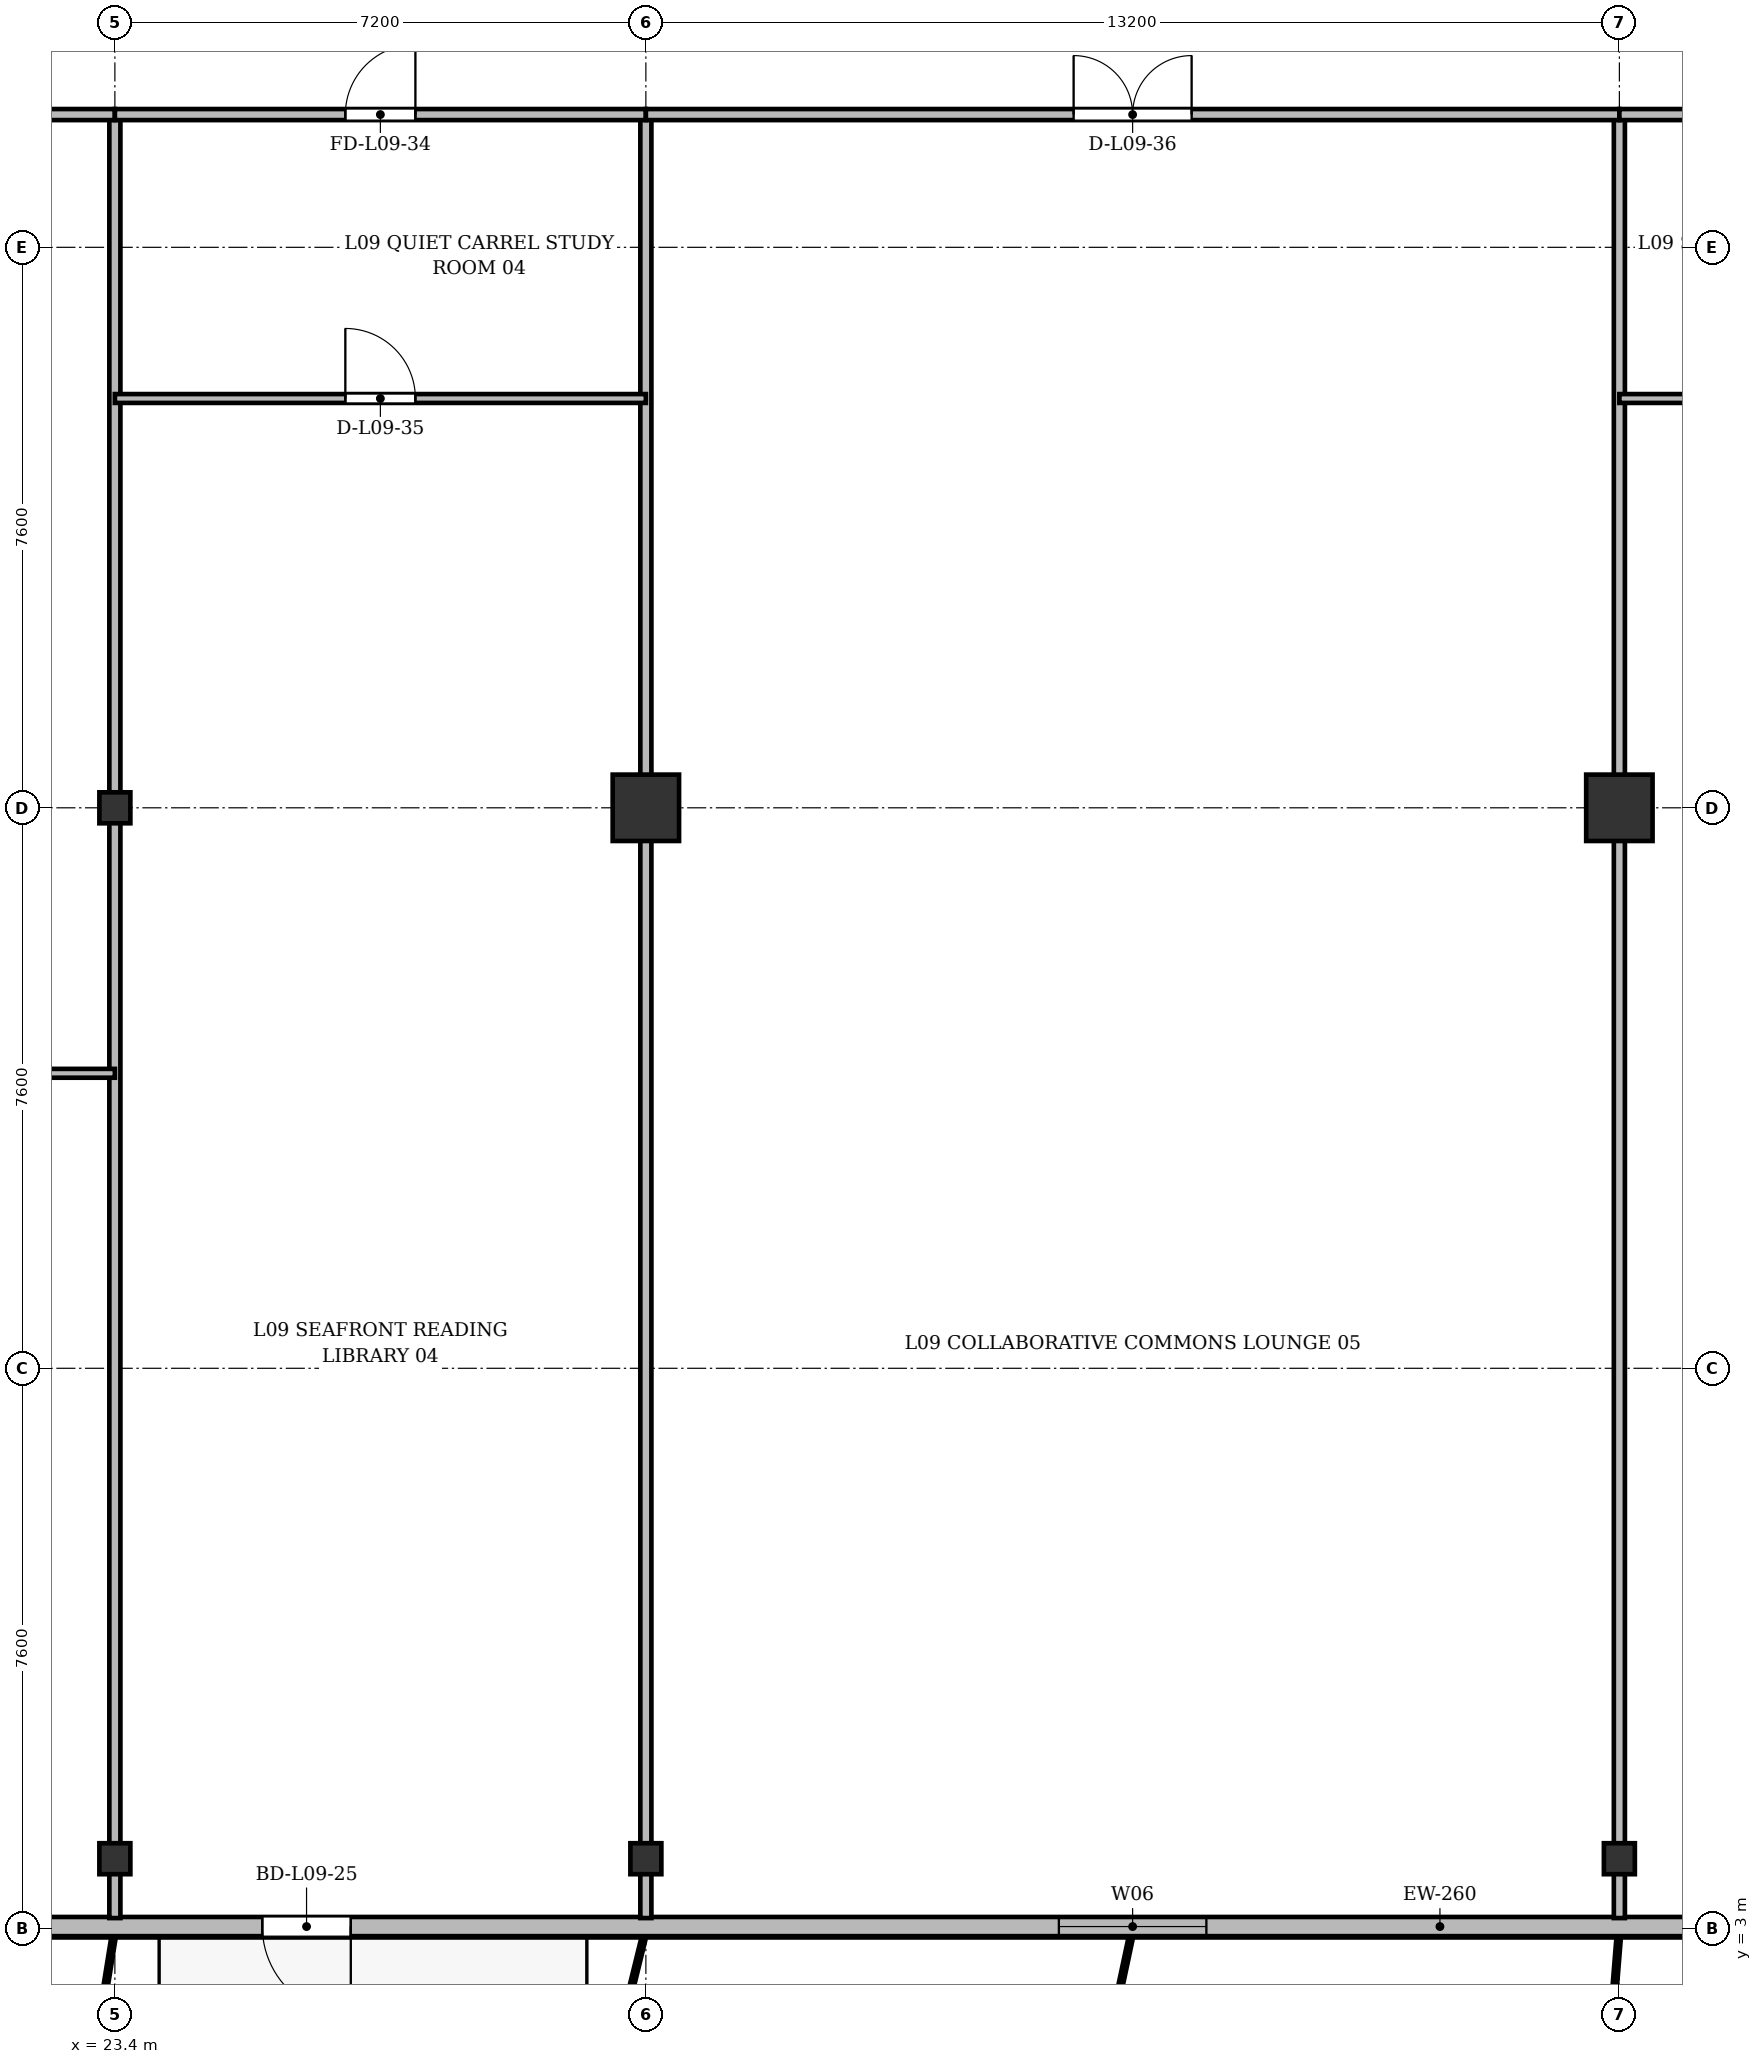
"""IFC4 building model, lengths in metres.
Left out: names, types, materials, properties, quantities, classifications, styles, units other than length and angle.
Written with IfcOpenShell. Run it as: python <this file> out.ifc"""

import sys

from ifc_helpers import new_model, si_unit, direction, frame, frame_2d, origin, origin_2d, place, context, subcontext, project, spatial, rectangle, i_section, extrude, source, transform, mapped, element, fill, save


model = new_model("IFC4")
c1 = context("Model", 3, precision=1e-05, world=origin(), true_north=direction((0.0, 1.0)))
c2 = subcontext(c1, "Body", "Model", "MODEL_VIEW")
j1 = project(units=[si_unit("LENGTHUNIT", "METRE"), si_unit("PLANEANGLEUNIT", "RADIAN")], contexts=[c1])
p1 = place(None, origin())
s1 = spatial("IfcSite", under=j1, at=p1, CompositionType="ELEMENT")
p2 = place(p1, origin())
s2 = spatial("IfcBuilding", under=s1, at=p2, CompositionType="ELEMENT")
p3 = place(p2, frame((0.0, 0.0, 37.9)))
s3 = spatial("IfcBuildingStorey", under=s2, at=p3, CompositionType="ELEMENT", Elevation=37.9)
m1 = source(origin(), c2, "Body", "SweptSolid", [
    extrude(i_section(OverallWidth=0.42, OverallDepth=0.42, WebThickness=0.026, FlangeThickness=0.04, at=origin_2d()), origin(), (0.0, 0.0, 1.0), 3.6),
])
for number, where, z_axis, x_axis in (
    (1, (23.4, 3.95, 0.0), (0.0, 0.0, 1.0), (1.0, 0.0, 0.0)),
    (2, (23.4, 18.2, 0.0), (0.0, 0.0, 1.0), (1.0, 0.0, 0.0)),
    (3, (30.6, 3.95, 0.0), (0.0, 0.0, 1.0), (1.0, 0.0, 0.0)),
):
    element("IfcColumn", number, at=place(p3, frame(where, z_axis=z_axis, x_axis=x_axis)), inside=s3, PredefinedType="COLUMN", context=c2, shape_type="MappedRepresentation", body=[
        mapped(m1, transform((0.0, 0.0, 0.0), x_axis=(1.0, 0.0, 0.0), y_axis=(0.0, 1.0, 0.0), z_axis=(0.0, 0.0, 1.0), scale=1.0)),
    ])
m2 = source(origin(), c2, "Body", "SweptSolid", [
    extrude(rectangle(XDim=0.9, YDim=0.9, at=origin_2d()), origin(), (0.0, 0.0, 1.0), 3.6),
])
p4 = place(p3, frame((30.6, 18.2, 0.0), z_axis=(0.0, 0.0, 1.0), x_axis=(1.0, 0.0, 0.0)))
e4 = element("IfcColumn", 4, at=p4, inside=s3, PredefinedType="COLUMN", context=c2, shape_type="MappedRepresentation", body=[
    mapped(m2, transform((0.0, 0.0, 0.0), x_axis=(1.0, 0.0, 0.0), y_axis=(0.0, 1.0, 0.0), z_axis=(0.0, 0.0, 1.0), scale=1.0)),
])
p5 = place(p3, frame((43.8, 3.95, 0.0), z_axis=(0.0, 0.0, 1.0), x_axis=(1.0, 0.0, 0.0)))
e5 = element("IfcColumn", 5, at=p5, inside=s3, PredefinedType="COLUMN", context=c2, shape_type="MappedRepresentation", body=[
    mapped(m1, transform((0.0, 0.0, 0.0), x_axis=(1.0, 0.0, 0.0), y_axis=(0.0, 1.0, 0.0), z_axis=(0.0, 0.0, 1.0), scale=1.0)),
])
p6 = place(p3, frame((43.8, 18.2, 0.0), z_axis=(0.0, 0.0, 1.0), x_axis=(1.0, 0.0, 0.0)))
e6 = element("IfcColumn", 6, at=p6, inside=s3, PredefinedType="COLUMN", context=c2, shape_type="MappedRepresentation", body=[
    mapped(m2, transform((0.0, 0.0, 0.0), x_axis=(1.0, 0.0, 0.0), y_axis=(0.0, 1.0, 0.0), z_axis=(0.0, 0.0, 1.0), scale=1.0)),
])
p7 = place(p3, frame((66.9, 3.03, 0.0), z_axis=(0.0, 0.0, 1.0), x_axis=(-1.0, 0.0, 0.0)))
e7 = element("IfcWall", 7, at=p7, inside=s3, PredefinedType="SOLIDWALL", context=c2, shape_type="SweptSolid", body=[
    extrude(rectangle(XDim=59.4, YDim=0.26, at=frame_2d((29.7, 0.0))), origin(), (0.0, 0.0, 1.0), 3.34),
])
p8 = place(p7, frame((3.8, 0.0, 0.9)))
e8 = element("IfcOpeningElement", 8, at=p8, cuts=e7, PredefinedType="OPENING", context=c2, shape_type="SweptSolid", body=[
    extrude(rectangle(XDim=1.8, YDim=1.8, at=frame_2d((0.9, 0.9))), frame((0.0, 0.14, 0.0), z_axis=(0.0, -1.0, 0.0), x_axis=(1.0, 0.0, 0.0)), (0.0, 0.0, 1.0), 0.28),
])
p9 = place(p7, frame((9.565, 0.0, 0.0)))
e9 = element("IfcOpeningElement", 9, at=p9, cuts=e7, PredefinedType="OPENING", context=c2, shape_type="SweptSolid", body=[
    extrude(rectangle(XDim=1.2, YDim=2.2, at=frame_2d((0.6, 1.1))), frame((0.0, 0.14, 0.0), z_axis=(0.0, -1.0, 0.0), x_axis=(1.0, 0.0, 0.0)), (0.0, 0.0, 1.0), 0.28),
])
p10 = place(p7, frame((18.75, 0.0, 0.9)))
e10 = element("IfcOpeningElement", 10, at=p10, cuts=e7, PredefinedType="OPENING", context=c2, shape_type="SweptSolid", body=[
    extrude(rectangle(XDim=1.5, YDim=1.75, at=frame_2d((0.75, 0.875))), frame((0.0, 0.14, 0.0), z_axis=(0.0, -1.0, 0.0), x_axis=(1.0, 0.0, 0.0)), (0.0, 0.0, 1.0), 0.28),
])
p11 = place(p7, frame((28.7, 0.0, 0.9)))
e11 = element("IfcOpeningElement", 11, at=p11, cuts=e7, PredefinedType="OPENING", context=c2, shape_type="SweptSolid", body=[
    extrude(rectangle(XDim=2.0, YDim=1.95, at=frame_2d((1.0, 0.975))), frame((0.0, 0.14, 0.0), z_axis=(0.0, -1.0, 0.0), x_axis=(1.0, 0.0, 0.0)), (0.0, 0.0, 1.0), 0.28),
])
p12 = place(p7, frame((40.301, 0.0, 0.0)))
e12 = element("IfcOpeningElement", 12, at=p12, cuts=e7, PredefinedType="OPENING", context=c2, shape_type="SweptSolid", body=[
    extrude(rectangle(XDim=1.2, YDim=2.2, at=frame_2d((0.6, 1.1))), frame((0.0, 0.14, 0.0), z_axis=(0.0, -1.0, 0.0), x_axis=(1.0, 0.0, 0.0)), (0.0, 0.0, 1.0), 0.28),
])
p13 = place(p7, frame((46.5, 0.0, 0.9)))
e13 = element("IfcOpeningElement", 13, at=p13, cuts=e7, PredefinedType="OPENING", context=c2, shape_type="SweptSolid", body=[
    extrude(rectangle(XDim=1.8, YDim=1.8, at=frame_2d((0.9, 0.9))), frame((0.0, 0.14, 0.0), z_axis=(0.0, -1.0, 0.0), x_axis=(1.0, 0.0, 0.0)), (0.0, 0.0, 1.0), 0.28),
])
p14 = place(p7, frame((55.817, 0.0, 0.0)))
e14 = element("IfcOpeningElement", 14, at=p14, cuts=e7, PredefinedType="OPENING", context=c2, shape_type="SweptSolid", body=[
    extrude(rectangle(XDim=1.2, YDim=2.2, at=frame_2d((0.6, 1.1))), frame((0.0, 0.14, 0.0), z_axis=(0.0, -1.0, 0.0), x_axis=(1.0, 0.0, 0.0)), (0.0, 0.0, 1.0), 0.28),
])
for number, where, z_axis, x_axis in (
    (15, (23.4, 3.145, 0.0), (0.0, 0.0, 1.0), (0.0, 1.0, 0.0)),
    (16, (30.6, 3.145, 0.0), (0.0, 0.0, 1.0), (0.0, 1.0, 0.0)),
    (17, (43.8, 3.145, 0.0), (0.0, 0.0, 1.0), (0.0, 1.0, 0.0)),
):
    element("IfcWall", number, at=place(p3, frame(where, z_axis=z_axis, x_axis=x_axis)), inside=s3, PredefinedType="PARTITIONING", context=c2, shape_type="SweptSolid", body=[
        extrude(rectangle(XDim=24.455, YDim=0.15, at=frame_2d((12.228, 0.0))), origin(), (0.0, 0.0, 1.0), 2.752),
    ])
p15 = place(p3, frame((15.6, 27.6, 0.0), z_axis=(0.0, 0.0, 1.0), x_axis=(1.0, 0.0, 0.0)))
e18 = element("IfcWall", 18, at=p15, inside=s3, PredefinedType="PARTITIONING", context=c2, shape_type="SweptSolid", body=[
    extrude(rectangle(XDim=7.8, YDim=0.15, at=frame_2d((3.9, 0.0))), origin(), (0.0, 0.0, 1.0), 2.752),
])
p16 = place(p15, frame((3.333, 0.0, 0.0)))
e19 = element("IfcOpeningElement", 19, at=p16, cuts=e18, PredefinedType="OPENING", context=c2, shape_type="SweptSolid", body=[
    extrude(rectangle(XDim=0.95, YDim=2.15, at=frame_2d((0.475, 1.075))), frame((0.0, 0.085, 0.0), z_axis=(0.0, -1.0, 0.0), x_axis=(1.0, 0.0, 0.0)), (0.0, 0.0, 1.0), 0.17),
])
p17 = place(p3, frame((15.6, 14.6, 0.0), z_axis=(0.0, 0.0, 1.0), x_axis=(1.0, 0.0, 0.0)))
e20 = element("IfcWall", 20, at=p17, inside=s3, PredefinedType="PARTITIONING", context=c2, shape_type="SweptSolid", body=[
    extrude(rectangle(XDim=7.8, YDim=0.12, at=frame_2d((3.9, 0.0))), origin(), (0.0, 0.0, 1.0), 2.752),
])
p18 = place(p17, frame((3.333, 0.0, 0.0)))
e21 = element("IfcOpeningElement", 21, at=p18, cuts=e20, PredefinedType="OPENING", context=c2, shape_type="SweptSolid", body=[
    extrude(rectangle(XDim=0.95, YDim=2.15, at=frame_2d((0.475, 1.075))), frame((0.0, 0.07, 0.0), z_axis=(0.0, -1.0, 0.0), x_axis=(1.0, 0.0, 0.0)), (0.0, 0.0, 1.0), 0.14),
])
p19 = place(p3, frame((23.4, 27.6, 0.0), z_axis=(0.0, 0.0, 1.0), x_axis=(1.0, 0.0, 0.0)))
e22 = element("IfcWall", 22, at=p19, inside=s3, PredefinedType="PARTITIONING", context=c2, shape_type="SweptSolid", body=[
    extrude(rectangle(XDim=7.2, YDim=0.15, at=frame_2d((3.6, 0.0))), origin(), (0.0, 0.0, 1.0), 2.752),
])
p20 = place(p19, frame((3.125, 0.0, 0.0)))
e23 = element("IfcOpeningElement", 23, at=p20, cuts=e22, PredefinedType="OPENING", context=c2, shape_type="SweptSolid", body=[
    extrude(rectangle(XDim=0.95, YDim=2.15, at=frame_2d((0.475, 1.075))), frame((0.0, 0.085, 0.0), z_axis=(0.0, -1.0, 0.0), x_axis=(1.0, 0.0, 0.0)), (0.0, 0.0, 1.0), 0.17),
])
p21 = place(p3, frame((23.4, 23.75, 0.0), z_axis=(0.0, 0.0, 1.0), x_axis=(1.0, 0.0, 0.0)))
e24 = element("IfcWall", 24, at=p21, inside=s3, PredefinedType="PARTITIONING", context=c2, shape_type="SweptSolid", body=[
    extrude(rectangle(XDim=7.2, YDim=0.12, at=frame_2d((3.6, 0.0))), origin(), (0.0, 0.0, 1.0), 2.752),
])
p22 = place(p21, frame((3.125, 0.0, 0.0)))
e25 = element("IfcOpeningElement", 25, at=p22, cuts=e24, PredefinedType="OPENING", context=c2, shape_type="SweptSolid", body=[
    extrude(rectangle(XDim=0.95, YDim=2.15, at=frame_2d((0.475, 1.075))), frame((0.0, 0.07, 0.0), z_axis=(0.0, -1.0, 0.0), x_axis=(1.0, 0.0, 0.0)), (0.0, 0.0, 1.0), 0.14),
])
p23 = place(p3, frame((30.6, 27.6, 0.0), z_axis=(0.0, 0.0, 1.0), x_axis=(1.0, 0.0, 0.0)))
e26 = element("IfcWall", 26, at=p23, inside=s3, PredefinedType="PARTITIONING", context=c2, shape_type="SweptSolid", body=[
    extrude(rectangle(XDim=13.2, YDim=0.15, at=frame_2d((6.6, 0.0))), origin(), (0.0, 0.0, 1.0), 2.752),
])
p24 = place(p23, frame((5.8, 0.0, 0.0)))
e27 = element("IfcOpeningElement", 27, at=p24, cuts=e26, PredefinedType="OPENING", context=c2, shape_type="SweptSolid", body=[
    extrude(rectangle(XDim=1.6, YDim=2.2, at=frame_2d((0.8, 1.1))), frame((0.0, 0.085, 0.0), z_axis=(0.0, -1.0, 0.0), x_axis=(1.0, 0.0, 0.0)), (0.0, 0.0, 1.0), 0.17),
])
p25 = place(p3, frame((43.8, 27.6, 0.0), z_axis=(0.0, 0.0, 1.0), x_axis=(1.0, 0.0, 0.0)))
e28 = element("IfcWall", 28, at=p25, inside=s3, PredefinedType="PARTITIONING", context=c2, shape_type="SweptSolid", body=[
    extrude(rectangle(XDim=7.2, YDim=0.15, at=frame_2d((3.6, 0.0))), origin(), (0.0, 0.0, 1.0), 2.752),
])
p26 = place(p25, frame((3.125, 0.0, 0.0)))
e29 = element("IfcOpeningElement", 29, at=p26, cuts=e28, PredefinedType="OPENING", context=c2, shape_type="SweptSolid", body=[
    extrude(rectangle(XDim=0.95, YDim=2.15, at=frame_2d((0.475, 1.075))), frame((0.0, 0.085, 0.0), z_axis=(0.0, -1.0, 0.0), x_axis=(1.0, 0.0, 0.0)), (0.0, 0.0, 1.0), 0.17),
])
p27 = place(p3, frame((43.8, 23.75, 0.0), z_axis=(0.0, 0.0, 1.0), x_axis=(1.0, 0.0, 0.0)))
e30 = element("IfcWall", 30, at=p27, inside=s3, PredefinedType="PARTITIONING", context=c2, shape_type="SweptSolid", body=[
    extrude(rectangle(XDim=7.2, YDim=0.12, at=frame_2d((3.6, 0.0))), origin(), (0.0, 0.0, 1.0), 2.752),
])
p28 = place(p27, frame((3.125, 0.0, 0.0)))
e31 = element("IfcOpeningElement", 31, at=p28, cuts=e30, PredefinedType="OPENING", context=c2, shape_type="SweptSolid", body=[
    extrude(rectangle(XDim=0.95, YDim=2.15, at=frame_2d((0.475, 1.075))), frame((0.0, 0.07, 0.0), z_axis=(0.0, -1.0, 0.0), x_axis=(1.0, 0.0, 0.0)), (0.0, 0.0, 1.0), 0.14),
])
m3 = source(origin(), c2, "Body", "SweptSolid", [
    extrude(rectangle(XDim=2.0, YDim=1.95, at=frame_2d((1.0, 0.975))), frame((0.0, 0.03, 0.0), z_axis=(0.0, -1.0, 0.0), x_axis=(1.0, 0.0, 0.0)), (0.0, 0.0, 1.0), 0.06),
])
p29 = place(p11, origin())
e32 = element("IfcWindow", 32, at=p29, inside=s3, PartitioningType="SINGLE_PANEL", PredefinedType="WINDOW", context=c2, shape_type="MappedRepresentation", body=[
    mapped(m3, transform((0.0, 0.0, 0.0), x_axis=(1.0, 0.0, 0.0), y_axis=(0.0, 1.0, 0.0), z_axis=(0.0, 0.0, 1.0), scale=1.0)),
])
fill(e11, e32)
m4 = source(origin(), c2, "Body", "SweptSolid", [
    extrude(rectangle(XDim=1.2, YDim=2.2, at=frame_2d((0.6, 1.1))), frame((0.0, 0.025, 0.0), z_axis=(0.0, -1.0, 0.0), x_axis=(1.0, 0.0, 0.0)), (0.0, 0.0, 1.0), 0.05),
])
p30 = place(p12, origin())
e33 = element("IfcDoor", 33, at=p30, inside=s3, OperationType="SINGLE_SWING_LEFT", PredefinedType="DOOR", context=c2, shape_type="MappedRepresentation", body=[
    mapped(m4, transform((0.0, 0.0, 0.0), x_axis=(1.0, 0.0, 0.0), y_axis=(0.0, 1.0, 0.0), z_axis=(0.0, 0.0, 1.0), scale=1.0)),
])
fill(e12, e33)
m5 = source(origin(), c2, "Body", "SweptSolid", [
    extrude(rectangle(XDim=0.95, YDim=2.15, at=frame_2d((0.475, 1.075))), frame((0.0, 0.025, 0.0), z_axis=(0.0, -1.0, 0.0), x_axis=(1.0, 0.0, 0.0)), (0.0, 0.0, 1.0), 0.05),
])
p31 = place(p20, origin())
e34 = element("IfcDoor", 34, at=p31, inside=s3, OperationType="SINGLE_SWING_RIGHT", PredefinedType="DOOR", context=c2, shape_type="MappedRepresentation", body=[
    mapped(m5, transform((0.0, 0.0, 0.0), x_axis=(1.0, 0.0, 0.0), y_axis=(0.0, 1.0, 0.0), z_axis=(0.0, 0.0, 1.0), scale=1.0)),
])
fill(e23, e34)
p32 = place(p22, origin())
e35 = element("IfcDoor", 35, at=p32, inside=s3, OperationType="SINGLE_SWING_LEFT", PredefinedType="DOOR", context=c2, shape_type="MappedRepresentation", body=[
    mapped(m5, transform((0.0, 0.0, 0.0), x_axis=(1.0, 0.0, 0.0), y_axis=(0.0, 1.0, 0.0), z_axis=(0.0, 0.0, 1.0), scale=1.0)),
])
fill(e25, e35)
m6 = source(origin(), c2, "Body", "SweptSolid", [
    extrude(rectangle(XDim=1.6, YDim=2.2, at=frame_2d((0.8, 1.1))), frame((0.0, 0.025, 0.0), z_axis=(0.0, -1.0, 0.0), x_axis=(1.0, 0.0, 0.0)), (0.0, 0.0, 1.0), 0.05),
])
p33 = place(p24, origin())
e36 = element("IfcDoor", 36, at=p33, inside=s3, OperationType="DOUBLE_DOOR_SINGLE_SWING", PredefinedType="DOOR", context=c2, shape_type="MappedRepresentation", body=[
    mapped(m6, transform((0.0, 0.0, 0.0), x_axis=(1.0, 0.0, 0.0), y_axis=(0.0, 1.0, 0.0), z_axis=(0.0, 0.0, 1.0), scale=1.0)),
])
fill(e27, e36)
save(model, sys.argv[1])
